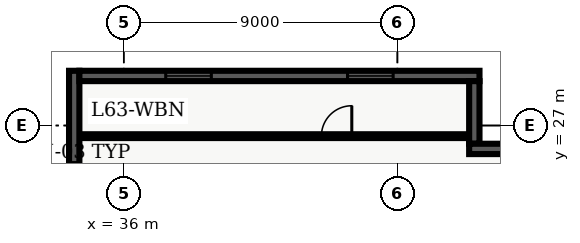
"""IFC4 building model, lengths in metres.
Left out: names, types, materials, properties, quantities, classifications, styles, units other than length and angle.
Written with IfcOpenShell. Run it as: python <this file> out.ifc"""

import sys

from ifc_helpers import new_model, entity, si_unit, converted_unit, direction, frame, origin_with_axes, origin_2d_with_axis, place, context, subcontext, project, spatial, polyline, rectangle, outline, extrude, element, fill, save


model = new_model("IFC4")
c1 = context("Model", 3, precision=1e-05, world=origin_with_axes(), true_north=direction((0.0, 1.0)))
c2 = subcontext(c1, "Body", "Model", "MODEL_VIEW")
j1 = project(units=[si_unit("LENGTHUNIT", "METRE"), converted_unit("PLANEANGLEUNIT", "DEGREE", entity("IfcPlaneAngleMeasure", 0.017), si_unit("PLANEANGLEUNIT", "RADIAN"), dimensions=[0, 0, 0, 0, 0, 0, 0])], contexts=[c1])
p1 = place(None, origin_with_axes())
s1 = spatial("IfcSite", under=j1, at=p1, CompositionType="ELEMENT")
p2 = place(p1, origin_with_axes())
s2 = spatial("IfcBuilding", under=s1, at=p2, CompositionType="ELEMENT")
p3 = place(p2, frame((0.0, 0.0, 256.8), z_axis=(0.0, 0.0, 1.0), x_axis=(1.0, 0.0, 0.0)))
s3 = spatial("IfcBuildingStorey", under=s2, at=p3, CompositionType="ELEMENT", Elevation=256.8)
p4 = place(p3, frame((34.535, 26.65, 0.0), z_axis=(0.0, 0.0, 1.0), x_axis=(1.0, 0.0, 0.0)))
e1 = element("IfcWall", 1, at=p4, inside=s3, PredefinedType="PARTITIONING", context=c2, shape_type="SweptSolid", body=[
    extrude(outline(polyline([(0.0, -0.062), (12.995, -0.062), (12.995, 0.062), (0.0, 0.062), (0.0, -0.062)])), origin_with_axes(), (0.0, 0.0, 1.0), 2.7),
])
p5 = place(p4, frame((8.465, 0.0, 0.0), z_axis=(0.0, 0.0, 1.0), x_axis=(1.0, 0.0, 0.0)))
e2 = element("IfcOpeningElement", 2, at=p5, cuts=e1, PredefinedType="OPENING", context=c2, shape_type="SweptSolid", body=[
    extrude(rectangle(XDim=1.0, YDim=0.145, at=origin_2d_with_axis()), origin_with_axes(), (0.0, 0.0, 1.0), 2.15),
])
p6 = place(p3, frame((34.37, 21.26, 0.0), z_axis=(0.0, 0.0, 1.0), x_axis=(0.0, 1.0, 0.0)))
e3 = element("IfcWall", 3, at=p6, inside=s3, PredefinedType="SOLIDWALL", context=c2, shape_type="SweptSolid", body=[
    extrude(outline(polyline([(0.0, -0.17), (7.54, -0.17), (7.54, 0.17), (0.0, 0.17), (0.0, -0.17)])), origin_with_axes(), (0.0, 0.0, 1.0), 3.66),
])
p7 = place(p6, frame((3.77, 0.0, 0.45), z_axis=(0.0, 0.0, 1.0), x_axis=(1.0, 0.0, 0.0)))
e4 = element("IfcOpeningElement", 4, at=p7, cuts=e3, PredefinedType="OPENING", context=c2, shape_type="SweptSolid", body=[
    extrude(rectangle(XDim=1.5, YDim=0.36, at=origin_2d_with_axis()), origin_with_axes(), (0.0, 0.0, 1.0), 2.1),
])
p8 = place(p3, frame((34.54, 28.63, 0.0), z_axis=(0.0, 0.0, 1.0), x_axis=(1.0, 0.0, 0.0)))
e5 = element("IfcWall", 5, at=p8, inside=s3, PredefinedType="SOLIDWALL", context=c2, shape_type="SweptSolid", body=[
    extrude(outline(polyline([(0.0, -0.17), (13.16, -0.17), (13.16, 0.17), (0.0, 0.17), (0.0, -0.17)])), origin_with_axes(), (0.0, 0.0, 1.0), 3.66),
])
p9 = place(p8, frame((3.59, 0.0, 0.45), z_axis=(0.0, 0.0, 1.0), x_axis=(1.0, 0.0, 0.0)))
e6 = element("IfcOpeningElement", 6, at=p9, cuts=e5, PredefinedType="OPENING", context=c2, shape_type="SweptSolid", body=[
    extrude(rectangle(XDim=1.5, YDim=0.36, at=origin_2d_with_axis()), origin_with_axes(), (0.0, 0.0, 1.0), 2.1),
])
p10 = place(p8, frame((9.57, 0.0, 0.45), z_axis=(0.0, 0.0, 1.0), x_axis=(1.0, 0.0, 0.0)))
e7 = element("IfcOpeningElement", 7, at=p10, cuts=e5, PredefinedType="OPENING", context=c2, shape_type="SweptSolid", body=[
    extrude(rectangle(XDim=1.5, YDim=0.36, at=origin_2d_with_axis()), origin_with_axes(), (0.0, 0.0, 1.0), 2.1),
])
p11 = place(p3, frame((47.53, 28.46, 0.0), z_axis=(0.0, 0.0, 1.0), x_axis=(0.0, -1.0, 0.0)))
e8 = element("IfcWall", 8, at=p11, inside=s3, PredefinedType="SOLIDWALL", context=c2, shape_type="SweptSolid", body=[
    extrude(outline(polyline([(0.0, -0.17), (2.06, -0.17), (2.06, 0.17), (0.0, 0.17), (0.0, -0.17)])), origin_with_axes(), (0.0, 0.0, 1.0), 3.66),
])
p12 = place(p3, frame((47.36, 26.23, 0.0), z_axis=(0.0, 0.0, 1.0), x_axis=(1.0, 0.0, 0.0)))
e9 = element("IfcWall", 9, at=p12, inside=s3, PredefinedType="SOLIDWALL", context=c2, shape_type="SweptSolid", body=[
    extrude(outline(polyline([(0.0, -0.17), (2.74, -0.17), (2.74, 0.17), (0.0, 0.17), (0.0, -0.17)])), origin_with_axes(), (0.0, 0.0, 1.0), 3.66),
])
p13 = place(p4, frame((8.465, 0.0, 0.0), z_axis=(0.0, 0.0, 1.0), x_axis=(1.0, 0.0, 0.0)))
e10 = element("IfcDoor", 10, at=p13, inside=s3, OperationType="SINGLE_SWING_RIGHT", PredefinedType="DOOR", context=c2, shape_type="SweptSolid", body=[
    extrude(rectangle(XDim=1.0, YDim=0.075, at=origin_2d_with_axis()), origin_with_axes(), (0.0, 0.0, 1.0), 2.15),
])
fill(e2, e10)
p14 = place(p8, frame((3.59, 0.0, 0.45), z_axis=(0.0, 0.0, 1.0), x_axis=(1.0, 0.0, 0.0)))
e11 = element("IfcWindow", 11, at=p14, inside=s3, PredefinedType="WINDOW", context=c2, shape_type="SweptSolid", body=[
    extrude(rectangle(XDim=1.5, YDim=0.09, at=origin_2d_with_axis()), origin_with_axes(), (0.0, 0.0, 1.0), 2.1),
])
fill(e6, e11)
p15 = place(p8, frame((9.57, 0.0, 0.45), z_axis=(0.0, 0.0, 1.0), x_axis=(1.0, 0.0, 0.0)))
e12 = element("IfcWindow", 12, at=p15, inside=s3, PredefinedType="WINDOW", context=c2, shape_type="SweptSolid", body=[
    extrude(rectangle(XDim=1.5, YDim=0.09, at=origin_2d_with_axis()), origin_with_axes(), (0.0, 0.0, 1.0), 2.1),
])
fill(e7, e12)
save(model, sys.argv[1])
